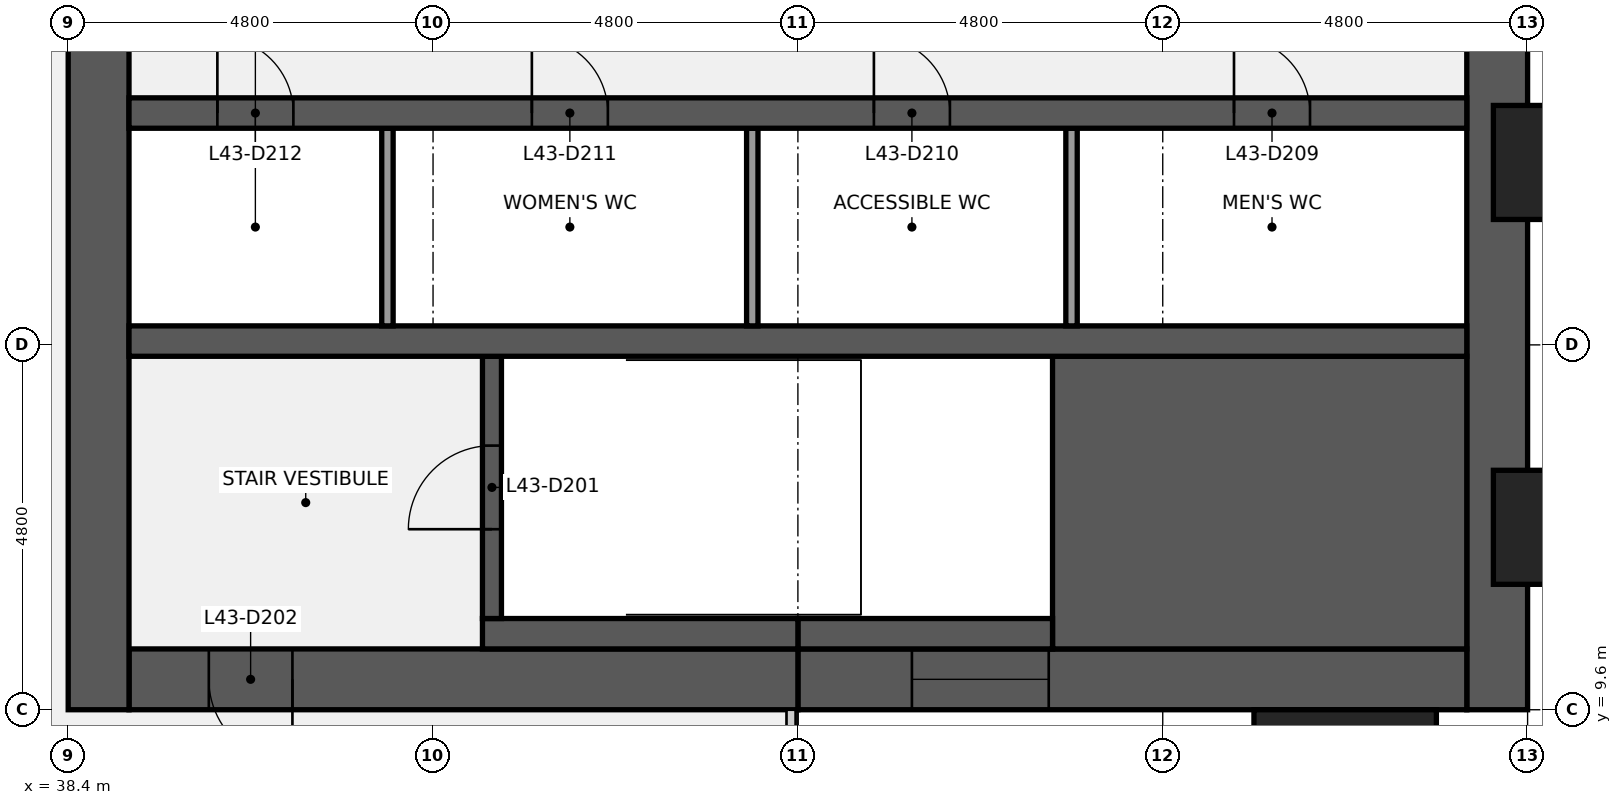
"""IFC4 building model, lengths in metres.
Left out: names, types, materials, properties, quantities, classifications, styles, units other than length and angle.
Written with IfcOpenShell. Run it as: python <this file> out.ifc"""

import sys

from ifc_helpers import new_model, si_unit, direction, frame, frame_2d, origin, origin_2d, place, context, subcontext, project, spatial, rectangle, extrude, element, fill, save


model = new_model("IFC4")
c1 = context("Model", 3, precision=1e-05, world=origin(), true_north=direction((0.0, 1.0)))
c2 = subcontext(c1, "Body", "Model", "MODEL_VIEW")
j1 = project(units=[si_unit("LENGTHUNIT", "METRE"), si_unit("PLANEANGLEUNIT", "RADIAN")], contexts=[c1])
p1 = place(None, origin())
s1 = spatial("IfcSite", under=j1, at=p1, CompositionType="ELEMENT")
p2 = place(p1, origin())
s2 = spatial("IfcBuilding", under=s1, at=p2, CompositionType="ELEMENT")
p3 = place(p2, frame((0.0, 0.0, 201.2)))
s3 = spatial("IfcBuildingStorey", under=s2, at=p3, CompositionType="ELEMENT", Elevation=201.2)
p4 = place(p3, frame((57.2, 38.4, 0.0), z_axis=(0.0, 0.0, 1.0), x_axis=(0.0, -1.0, 0.0)))
e1 = element("IfcWall", 1, at=p4, inside=s3, PredefinedType="SHEAR", context=c2, shape_type="SweptSolid", body=[
    extrude(rectangle(XDim=28.8, YDim=0.8, at=frame_2d((14.4, 0.0))), origin(), (0.0, 0.0, 1.0), 3.84),
])
p5 = place(p4, frame((18.45, 0.0, 0.9)))
e2 = element("IfcOpeningElement", 2, at=p5, cuts=e1, PredefinedType="OPENING", context=c2, shape_type="SweptSolid", body=[
    extrude(rectangle(XDim=1.5, YDim=1.5, at=frame_2d((0.75, 0.75))), frame((0.0, 0.41, 0.0), z_axis=(0.0, -1.0, 0.0), x_axis=(1.0, 0.0, 0.0)), (0.0, 0.0, 1.0), 0.82),
])
p6 = place(p4, frame((8.85, 0.0, 0.9)))
e3 = element("IfcOpeningElement", 3, at=p6, cuts=e1, PredefinedType="OPENING", context=c2, shape_type="SweptSolid", body=[
    extrude(rectangle(XDim=1.5, YDim=1.5, at=frame_2d((0.75, 0.75))), frame((0.0, 0.41, 0.0), z_axis=(0.0, -1.0, 0.0), x_axis=(1.0, 0.0, 0.0)), (0.0, 0.0, 1.0), 0.82),
])
p7 = place(p3, frame((56.8, 10.0, 0.0), z_axis=(0.0, 0.0, 1.0), x_axis=(-1.0, 0.0, 0.0)))
e4 = element("IfcWall", 4, at=p7, inside=s3, PredefinedType="SHEAR", context=c2, shape_type="SweptSolid", body=[
    extrude(rectangle(XDim=8.8, YDim=0.8, at=frame_2d((4.4, 0.0))), origin(), (0.0, 0.0, 1.0), 3.84),
])
p8 = place(p7, frame((5.5, 0.0, 0.9)))
e5 = element("IfcOpeningElement", 5, at=p8, cuts=e4, PredefinedType="OPENING", context=c2, shape_type="SweptSolid", body=[
    extrude(rectangle(XDim=1.8, YDim=1.5, at=frame_2d((0.9, 0.75))), frame((0.0, 0.41, 0.0), z_axis=(0.0, -1.0, 0.0), x_axis=(1.0, 0.0, 0.0)), (0.0, 0.0, 1.0), 0.82),
])
p9 = place(p3, frame((48.0, 10.0, 0.0), z_axis=(0.0, 0.0, 1.0), x_axis=(-1.0, 0.0, 0.0)))
e6 = element("IfcWall", 6, at=p9, inside=s3, PredefinedType="SHEAR", context=c2, shape_type="SweptSolid", body=[
    extrude(rectangle(XDim=8.8, YDim=0.8, at=frame_2d((4.4, 0.0))), origin(), (0.0, 0.0, 1.0), 3.84),
])
p10 = place(p9, frame((6.65, 0.0, 0.0)))
e7 = element("IfcOpeningElement", 7, at=p10, cuts=e6, PredefinedType="OPENING", context=c2, shape_type="SweptSolid", body=[
    extrude(rectangle(XDim=1.1, YDim=2.1, at=frame_2d((0.55, 1.05))), frame((0.0, 0.41, 0.0), z_axis=(0.0, -1.0, 0.0), x_axis=(1.0, 0.0, 0.0)), (0.0, 0.0, 1.0), 0.82),
])
p11 = place(p3, frame((38.8, 9.6, 0.0), z_axis=(0.0, 0.0, 1.0), x_axis=(0.0, 1.0, 0.0)))
e8 = element("IfcWall", 8, at=p11, inside=s3, PredefinedType="SHEAR", context=c2, shape_type="SweptSolid", body=[
    extrude(rectangle(XDim=28.8, YDim=0.8, at=frame_2d((14.4, 0.0))), origin(), (0.0, 0.0, 1.0), 3.84),
])
p12 = place(p11, frame((8.7, 0.0, 0.0)))
e9 = element("IfcOpeningElement", 9, at=p12, cuts=e8, PredefinedType="OPENING", context=c2, shape_type="SweptSolid", body=[
    extrude(rectangle(XDim=1.8, YDim=2.1, at=frame_2d((0.9, 1.05))), frame((0.0, 0.41, 0.0), z_axis=(0.0, -1.0, 0.0), x_axis=(1.0, 0.0, 0.0)), (0.0, 0.0, 1.0), 0.82),
])
p13 = place(p11, frame((18.3, 0.0, 0.0)))
e10 = element("IfcOpeningElement", 10, at=p13, cuts=e8, PredefinedType="OPENING", context=c2, shape_type="SweptSolid", body=[
    extrude(rectangle(XDim=1.8, YDim=2.1, at=frame_2d((0.9, 1.05))), frame((0.0, 0.41, 0.0), z_axis=(0.0, -1.0, 0.0), x_axis=(1.0, 0.0, 0.0)), (0.0, 0.0, 1.0), 0.82),
])
p14 = place(p3, frame((51.35, 12.325, 0.0), z_axis=(0.0, 0.0, 1.0), x_axis=(1.0, 0.0, 0.0)))
e11 = element("IfcWall", 11, at=p14, inside=s3, PredefinedType="SHEAR", context=c2, shape_type="SweptSolid", body=[
    extrude(rectangle(XDim=5.45, YDim=3.85, at=frame_2d((2.725, 0.0))), origin(), (0.0, 0.0, 1.0), 3.84),
])
p15 = place(p3, frame((48.0, 10.6, 0.0), z_axis=(0.0, 0.0, 1.0), x_axis=(1.0, 0.0, 0.0)))
e12 = element("IfcWall", 12, at=p15, inside=s3, PredefinedType="SHEAR", context=c2, shape_type="SweptSolid", body=[
    extrude(rectangle(XDim=3.35, YDim=0.4, at=frame_2d((1.675, 0.0))), origin(), (0.0, 0.0, 1.0), 3.84),
])
p16 = place(p3, frame((43.85, 10.6, 0.0), z_axis=(0.0, 0.0, 1.0), x_axis=(1.0, 0.0, 0.0)))
e13 = element("IfcWall", 13, at=p16, inside=s3, PredefinedType="SHEAR", context=c2, shape_type="SweptSolid", body=[
    extrude(rectangle(XDim=4.15, YDim=0.4, at=frame_2d((2.075, 0.0))), origin(), (0.0, 0.0, 1.0), 3.84),
])
p17 = place(p3, frame((43.975, 10.8, 0.0), z_axis=(0.0, 0.0, 1.0), x_axis=(0.0, 1.0, 0.0)))
e14 = element("IfcWall", 14, at=p17, inside=s3, PredefinedType="SHEAR", context=c2, shape_type="SweptSolid", body=[
    extrude(rectangle(XDim=3.45, YDim=0.25, at=frame_2d((1.725, 0.0))), origin(), (0.0, 0.0, 1.0), 3.84),
])
p18 = place(p17, frame((1.175, 0.0, 0.0)))
e15 = element("IfcOpeningElement", 15, at=p18, cuts=e14, PredefinedType="OPENING", context=c2, shape_type="SweptSolid", body=[
    extrude(rectangle(XDim=1.1, YDim=2.1, at=frame_2d((0.55, 1.05))), frame((0.0, 0.135, 0.0), z_axis=(0.0, -1.0, 0.0), x_axis=(1.0, 0.0, 0.0)), (0.0, 0.0, 1.0), 0.27),
])
p19 = place(p3, frame((39.2, 14.45, 0.0), z_axis=(0.0, 0.0, 1.0), x_axis=(1.0, 0.0, 0.0)))
e16 = element("IfcWall", 16, at=p19, inside=s3, PredefinedType="SHEAR", context=c2, shape_type="SweptSolid", body=[
    extrude(rectangle(XDim=17.6, YDim=0.4, at=frame_2d((8.8, 0.0))), origin(), (0.0, 0.0, 1.0), 3.84),
])
for number, where, z_axis, x_axis in (
    (17, (51.6, 14.65, 0.0), (0.0, 0.0, 1.0), (0.0, 1.0, 0.0)),
    (18, (47.4, 14.65, 0.0), (0.0, 0.0, 1.0), (0.0, 1.0, 0.0)),
    (19, (42.6, 14.65, 0.0), (0.0, 0.0, 1.0), (0.0, 1.0, 0.0)),
):
    element("IfcWall", number, at=place(p3, frame(where, z_axis=z_axis, x_axis=x_axis)), inside=s3, PredefinedType="PARTITIONING", context=c2, shape_type="SweptSolid", body=[
        extrude(rectangle(XDim=2.6, YDim=0.15, at=frame_2d((1.3, 0.0))), origin(), (0.0, 0.0, 1.0), 3.84),
    ])
p20 = place(p3, frame((39.2, 17.45, 0.0), z_axis=(0.0, 0.0, 1.0), x_axis=(1.0, 0.0, 0.0)))
e20 = element("IfcWall", 20, at=p20, inside=s3, PredefinedType="SHEAR", context=c2, shape_type="SweptSolid", body=[
    extrude(rectangle(XDim=17.6, YDim=0.4, at=frame_2d((8.8, 0.0))), origin(), (0.0, 0.0, 1.0), 3.84),
])
p21 = place(p20, frame((14.538, 0.0, 0.0)))
e21 = element("IfcOpeningElement", 21, at=p21, cuts=e20, PredefinedType="OPENING", context=c2, shape_type="SweptSolid", body=[
    extrude(rectangle(XDim=1.0, YDim=2.1, at=frame_2d((0.5, 1.05))), frame((0.0, 0.21, 0.0), z_axis=(0.0, -1.0, 0.0), x_axis=(1.0, 0.0, 0.0)), (0.0, 0.0, 1.0), 0.42),
])
p22 = place(p20, frame((9.8, 0.0, 0.0)))
e22 = element("IfcOpeningElement", 22, at=p22, cuts=e20, PredefinedType="OPENING", context=c2, shape_type="SweptSolid", body=[
    extrude(rectangle(XDim=1.0, YDim=2.1, at=frame_2d((0.5, 1.05))), frame((0.0, 0.21, 0.0), z_axis=(0.0, -1.0, 0.0), x_axis=(1.0, 0.0, 0.0)), (0.0, 0.0, 1.0), 0.42),
])
p23 = place(p20, frame((5.3, 0.0, 0.0)))
e23 = element("IfcOpeningElement", 23, at=p23, cuts=e20, PredefinedType="OPENING", context=c2, shape_type="SweptSolid", body=[
    extrude(rectangle(XDim=1.0, YDim=2.1, at=frame_2d((0.5, 1.05))), frame((0.0, 0.21, 0.0), z_axis=(0.0, -1.0, 0.0), x_axis=(1.0, 0.0, 0.0)), (0.0, 0.0, 1.0), 0.42),
])
p24 = place(p20, frame((1.163, 0.0, 0.0)))
e24 = element("IfcOpeningElement", 24, at=p24, cuts=e20, PredefinedType="OPENING", context=c2, shape_type="SweptSolid", body=[
    extrude(rectangle(XDim=1.0, YDim=2.1, at=frame_2d((0.5, 1.05))), frame((0.0, 0.21, 0.0), z_axis=(0.0, -1.0, 0.0), x_axis=(1.0, 0.0, 0.0)), (0.0, 0.0, 1.0), 0.42),
])
for number, where, z_axis, x_axis in (
    (25, (55.2, 8.85, 0.0), (0.0, 0.0, 1.0), (1.0, 0.0, 0.0)),
    (26, (58.35, 12.0, 0.0), (0.0, 0.0, 1.0), (0.0, 1.0, 0.0)),
    (27, (58.35, 16.8, 0.0), (0.0, 0.0, 1.0), (0.0, 1.0, 0.0)),
):
    element("IfcColumn", number, at=place(p3, frame(where, z_axis=z_axis, x_axis=x_axis)), inside=s3, PredefinedType="PILASTER", context=c2, shape_type="SweptSolid", body=[
        extrude(rectangle(XDim=2.4, YDim=1.5, at=origin_2d()), origin(), (0.0, 0.0, 1.0), 4.0),
    ])
p25 = place(p18, origin())
e28 = element("IfcDoor", 28, at=p25, inside=s3, OperationType="SINGLE_SWING_LEFT", PredefinedType="DOOR", context=c2, shape_type="SweptSolid", body=[
    extrude(rectangle(XDim=1.1, YDim=2.1, at=frame_2d((0.55, 1.05))), frame((0.0, 0.025, 0.0), z_axis=(0.0, -1.0, 0.0), x_axis=(1.0, 0.0, 0.0)), (0.0, 0.0, 1.0), 0.05),
])
fill(e15, e28)
p26 = place(p10, origin())
e29 = element("IfcDoor", 29, at=p26, inside=s3, OperationType="SINGLE_SWING_LEFT", PredefinedType="DOOR", context=c2, shape_type="SweptSolid", body=[
    extrude(rectangle(XDim=1.1, YDim=2.1, at=frame_2d((0.55, 1.05))), frame((0.0, 0.025, 0.0), z_axis=(0.0, -1.0, 0.0), x_axis=(1.0, 0.0, 0.0)), (0.0, 0.0, 1.0), 0.05),
])
fill(e7, e29)
p27 = place(p21, origin())
e30 = element("IfcDoor", 30, at=p27, inside=s3, OperationType="SINGLE_SWING_LEFT", PredefinedType="DOOR", context=c2, shape_type="SweptSolid", body=[
    extrude(rectangle(XDim=1.0, YDim=2.1, at=frame_2d((0.5, 1.05))), frame((0.0, 0.025, 0.0), z_axis=(0.0, -1.0, 0.0), x_axis=(1.0, 0.0, 0.0)), (0.0, 0.0, 1.0), 0.05),
])
fill(e21, e30)
p28 = place(p22, origin())
e31 = element("IfcDoor", 31, at=p28, inside=s3, OperationType="SINGLE_SWING_LEFT", PredefinedType="DOOR", context=c2, shape_type="SweptSolid", body=[
    extrude(rectangle(XDim=1.0, YDim=2.1, at=frame_2d((0.5, 1.05))), frame((0.0, 0.025, 0.0), z_axis=(0.0, -1.0, 0.0), x_axis=(1.0, 0.0, 0.0)), (0.0, 0.0, 1.0), 0.05),
])
fill(e22, e31)
p29 = place(p23, origin())
e32 = element("IfcDoor", 32, at=p29, inside=s3, OperationType="SINGLE_SWING_LEFT", PredefinedType="DOOR", context=c2, shape_type="SweptSolid", body=[
    extrude(rectangle(XDim=1.0, YDim=2.1, at=frame_2d((0.5, 1.05))), frame((0.0, 0.025, 0.0), z_axis=(0.0, -1.0, 0.0), x_axis=(1.0, 0.0, 0.0)), (0.0, 0.0, 1.0), 0.05),
])
fill(e23, e32)
p30 = place(p24, origin())
e33 = element("IfcDoor", 33, at=p30, inside=s3, OperationType="SINGLE_SWING_LEFT", PredefinedType="DOOR", context=c2, shape_type="SweptSolid", body=[
    extrude(rectangle(XDim=1.0, YDim=2.1, at=frame_2d((0.5, 1.05))), frame((0.0, 0.025, 0.0), z_axis=(0.0, -1.0, 0.0), x_axis=(1.0, 0.0, 0.0)), (0.0, 0.0, 1.0), 0.05),
])
fill(e24, e33)
p31 = place(p8, origin())
e34 = element("IfcWindow", 34, at=p31, inside=s3, PartitioningType="SINGLE_PANEL", PredefinedType="WINDOW", context=c2, shape_type="SweptSolid", body=[
    extrude(rectangle(XDim=1.8, YDim=1.5, at=frame_2d((0.9, 0.75))), frame((0.0, 0.03, 0.0), z_axis=(0.0, -1.0, 0.0), x_axis=(1.0, 0.0, 0.0)), (0.0, 0.0, 1.0), 0.06),
])
fill(e5, e34)
save(model, sys.argv[1])
